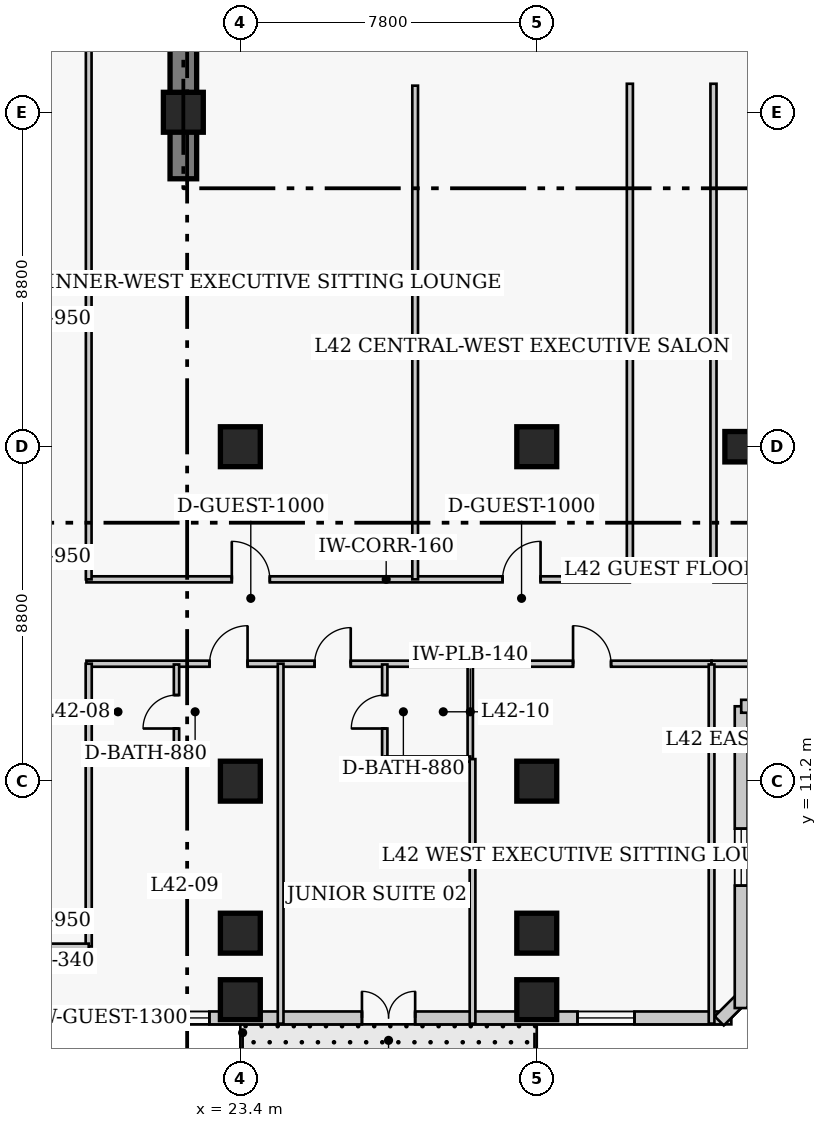
"""IFC4 building model, lengths in metres.
Left out: names, types, materials, properties, quantities, classifications, styles, units other than length and angle.
Written with IfcOpenShell. Run it as: python <this file> out.ifc"""

import sys

from ifc_helpers import new_model, si_unit, direction, frame, frame_2d, origin, origin_2d, place, context, subcontext, project, spatial, rectangle, extrude, element, fill, save


model = new_model("IFC4")
c1 = context("Model", 3, precision=1e-05, world=origin(), true_north=direction((0.0, 1.0)))
c2 = subcontext(c1, "Body", "Model", "MODEL_VIEW")
j1 = project(units=[si_unit("LENGTHUNIT", "METRE"), si_unit("PLANEANGLEUNIT", "RADIAN")], contexts=[c1])
p1 = place(None, origin())
s1 = spatial("IfcSite", under=j1, at=p1, CompositionType="ELEMENT")
p2 = place(p1, origin())
s2 = spatial("IfcBuilding", under=s1, at=p2, CompositionType="ELEMENT")
p3 = place(p2, frame((0.0, 0.0, 168.8)))
s3 = spatial("IfcBuildingStorey", under=s2, at=p3, CompositionType="ELEMENT", Elevation=168.8)
p4 = place(p3, frame((21.9, 27.05, 0.0), z_axis=(0.0, 0.0, 1.0), x_axis=(0.0, 1.0, 0.0)))
e1 = element("IfcWall", 1, at=p4, inside=s3, PredefinedType="SHEAR", context=c2, shape_type="SweptSolid", body=[
    extrude(rectangle(XDim=13.62, YDim=0.7, at=frame_2d((6.81, 0.0))), origin(), (0.0, 0.0, 1.0), 3.8),
])
for number, where, z_axis, x_axis in (
    (2, (23.4, 11.2, 0.0), (0.0, 0.0, 1.0), (1.0, 0.0, 0.0)),
    (3, (23.4, 20.0, 0.0), (0.0, 0.0, 1.0), (1.0, 0.0, 0.0)),
    (4, (31.2, 11.2, 0.0), (0.0, 0.0, 1.0), (1.0, 0.0, 0.0)),
    (5, (31.2, 20.0, 0.0), (0.0, 0.0, 1.0), (1.0, 0.0, 0.0)),
):
    element("IfcColumn", number, at=place(p3, frame(where, z_axis=z_axis, x_axis=x_axis)), inside=s3, PredefinedType="COLUMN", context=c2, shape_type="SweptSolid", body=[
        extrude(rectangle(XDim=1.05, YDim=1.05, at=origin_2d()), origin(), (0.0, 0.0, 1.0), 3.8),
    ])
p5 = place(p3, frame((36.75, 20.0, 0.0), z_axis=(0.0, 0.0, 1.0), x_axis=(1.0, 0.0, 0.0)))
e6 = element("IfcColumn", 6, at=p5, inside=s3, PredefinedType="COLUMN", context=c2, shape_type="SweptSolid", body=[
    extrude(rectangle(XDim=1.2, YDim=0.8, at=origin_2d()), origin(), (0.0, 0.0, 1.0), 3.8),
])
for number, where, z_axis, x_axis in (
    (7, (21.9, 28.8, 0.0), (0.0, 0.0, 1.0), (1.0, 0.0, 0.0)),
    (8, (23.4, 7.2, 0.0), (0.0, 0.0, 1.0), (1.0, 0.0, 0.0)),
    (9, (31.2, 7.2, 0.0), (0.0, 0.0, 1.0), (1.0, 0.0, 0.0)),
    (10, (23.4, 5.45, 0.0), (0.0, 0.0, 1.0), (1.0, 0.0, 0.0)),
    (11, (31.2, 5.45, 0.0), (0.0, 0.0, 1.0), (1.0, 0.0, 0.0)),
):
    element("IfcColumn", number, at=place(p3, frame(where, z_axis=z_axis, x_axis=x_axis)), inside=s3, PredefinedType="COLUMN", context=c2, shape_type="SweptSolid", body=[
        extrude(rectangle(XDim=1.05, YDim=1.05, at=origin_2d()), origin(), (0.0, 0.0, 1.0), 3.8),
    ])
p6 = place(p3, frame((9.63, 4.97, 0.0), z_axis=(0.0, 0.0, 1.0), x_axis=(1.0, 0.0, 0.0)))
e12 = element("IfcWall", 12, at=p6, inside=s3, PredefinedType="SOLIDWALL", context=c2, shape_type="SweptSolid", body=[
    extrude(rectangle(XDim=26.69, YDim=0.34, at=frame_2d((13.345, 0.0))), origin(), (0.0, 0.0, 1.0), 3.55),
])
p7 = place(p6, frame((16.97, 0.0, 0.0)))
e13 = element("IfcOpeningElement", 13, at=p7, cuts=e12, PredefinedType="OPENING", context=c2, shape_type="SweptSolid", body=[
    extrude(rectangle(XDim=1.4, YDim=2.15, at=frame_2d((0.7, 1.075))), frame((0.0, 0.18, 0.0), z_axis=(0.0, -1.0, 0.0), x_axis=(1.0, 0.0, 0.0)), (0.0, 0.0, 1.0), 0.36),
])
p8 = place(p6, frame((3.048, 0.0, 0.85)))
e14 = element("IfcOpeningElement", 14, at=p8, cuts=e12, PredefinedType="OPENING", context=c2, shape_type="SweptSolid", body=[
    extrude(rectangle(XDim=1.5, YDim=1.75, at=frame_2d((0.75, 0.875))), frame((0.0, 0.18, 0.0), z_axis=(0.0, -1.0, 0.0), x_axis=(1.0, 0.0, 0.0)), (0.0, 0.0, 1.0), 0.36),
])
p9 = place(p6, frame((22.642, 0.0, 0.85)))
e15 = element("IfcOpeningElement", 15, at=p9, cuts=e12, PredefinedType="OPENING", context=c2, shape_type="SweptSolid", body=[
    extrude(rectangle(XDim=1.5, YDim=1.75, at=frame_2d((0.75, 0.875))), frame((0.0, 0.18, 0.0), z_axis=(0.0, -1.0, 0.0), x_axis=(1.0, 0.0, 0.0)), (0.0, 0.0, 1.0), 0.36),
])
p10 = place(p6, frame((11.655, 0.0, 0.85)))
e16 = element("IfcOpeningElement", 16, at=p10, cuts=e12, PredefinedType="OPENING", context=c2, shape_type="SweptSolid", body=[
    extrude(rectangle(XDim=1.3, YDim=1.7, at=frame_2d((0.65, 0.85))), frame((0.0, 0.18, 0.0), z_axis=(0.0, -1.0, 0.0), x_axis=(1.0, 0.0, 0.0)), (0.0, 0.0, 1.0), 0.36),
])
p11 = place(p3, frame((36.001, 4.892, 0.0), z_axis=(0.0, 0.0, 1.0), x_axis=(0.707106781187, 0.707106781187, 0.0)))
e17 = element("IfcWall", 17, at=p11, inside=s3, PredefinedType="SOLIDWALL", context=c2, shape_type="SweptSolid", body=[
    extrude(rectangle(XDim=0.929, YDim=0.34, at=frame_2d((0.464, 0.0))), origin(), (0.0, 0.0, 1.0), 3.55),
])
p12 = place(p3, frame((36.58, 5.23, 0.0), z_axis=(0.0, 0.0, 1.0), x_axis=(0.0, 1.0, 0.0)))
e18 = element("IfcWall", 18, at=p12, inside=s3, PredefinedType="SOLIDWALL", context=c2, shape_type="SweptSolid", body=[
    extrude(rectangle(XDim=7.94, YDim=0.34, at=frame_2d((3.97, 0.0))), origin(), (0.0, 0.0, 1.0), 3.55),
])
p13 = place(p12, frame((3.22, 0.0, 0.85)))
e19 = element("IfcOpeningElement", 19, at=p13, cuts=e18, PredefinedType="OPENING", context=c2, shape_type="SweptSolid", body=[
    extrude(rectangle(XDim=1.5, YDim=1.75, at=frame_2d((0.75, 0.875))), frame((0.0, 0.18, 0.0), z_axis=(0.0, -1.0, 0.0), x_axis=(1.0, 0.0, 0.0)), (0.0, 0.0, 1.0), 0.36),
])
p14 = place(p3, frame((36.58, 13.17, 0.0), z_axis=(0.0, 0.0, 1.0), x_axis=(1.0, 0.0, 0.0)))
e20 = element("IfcWall", 20, at=p14, inside=s3, PredefinedType="SOLIDWALL", context=c2, shape_type="SweptSolid", body=[
    extrude(rectangle(XDim=4.84, YDim=0.34, at=frame_2d((2.42, 0.0))), origin(), (0.0, 0.0, 1.0), 3.55),
])
p15 = place(p14, frame((1.67, 0.0, 0.85)))
e21 = element("IfcOpeningElement", 21, at=p15, cuts=e20, PredefinedType="OPENING", context=c2, shape_type="SweptSolid", body=[
    extrude(rectangle(XDim=1.5, YDim=1.75, at=frame_2d((0.75, 0.875))), frame((0.0, 0.18, 0.0), z_axis=(0.0, -1.0, 0.0), x_axis=(1.0, 0.0, 0.0)), (0.0, 0.0, 1.0), 0.36),
])
p16 = place(p3, frame((19.35, 16.51, 0.0), z_axis=(0.0, 0.0, 1.0), x_axis=(1.0, 0.0, 0.0)))
e22 = element("IfcWall", 22, at=p16, inside=s3, PredefinedType="PARTITIONING", context=c2, shape_type="SweptSolid", body=[
    extrude(rectangle(XDim=14.3, YDim=0.16, at=frame_2d((7.15, 0.0))), origin(), (0.0, 0.0, 1.0), 3.55),
])
p17 = place(p16, frame((3.825, 0.0, 0.0)))
e23 = element("IfcOpeningElement", 23, at=p17, cuts=e22, PredefinedType="OPENING", context=c2, shape_type="SweptSolid", body=[
    extrude(rectangle(XDim=1.0, YDim=2.15, at=frame_2d((0.5, 1.075))), frame((0.0, 0.09, 0.0), z_axis=(0.0, -1.0, 0.0), x_axis=(1.0, 0.0, 0.0)), (0.0, 0.0, 1.0), 0.18),
])
p18 = place(p16, frame((10.95, 0.0, 0.0)))
e24 = element("IfcOpeningElement", 24, at=p18, cuts=e22, PredefinedType="OPENING", context=c2, shape_type="SweptSolid", body=[
    extrude(rectangle(XDim=1.0, YDim=2.15, at=frame_2d((0.5, 1.075))), frame((0.0, 0.09, 0.0), z_axis=(0.0, -1.0, 0.0), x_axis=(1.0, 0.0, 0.0)), (0.0, 0.0, 1.0), 0.18),
])
p19 = place(p3, frame((35.85, 16.51, 0.0), z_axis=(0.0, 0.0, 1.0), x_axis=(1.0, 0.0, 0.0)))
e25 = element("IfcWall", 25, at=p19, inside=s3, PredefinedType="PARTITIONING", context=c2, shape_type="SweptSolid", body=[
    extrude(rectangle(XDim=22.6, YDim=0.16, at=frame_2d((11.3, 0.0))), origin(), (0.0, 0.0, 1.0), 3.55),
])
p20 = place(p19, frame((10.35, 0.0, 0.0)))
e26 = element("IfcOpeningElement", 26, at=p20, cuts=e25, PredefinedType="OPENING", context=c2, shape_type="SweptSolid", body=[
    extrude(rectangle(XDim=1.0, YDim=2.15, at=frame_2d((0.5, 1.075))), frame((0.0, 0.09, 0.0), z_axis=(0.0, -1.0, 0.0), x_axis=(1.0, 0.0, 0.0)), (0.0, 0.0, 1.0), 0.18),
])
p21 = place(p19, frame((18.65, 0.0, 0.0)))
e27 = element("IfcOpeningElement", 27, at=p21, cuts=e25, PredefinedType="OPENING", context=c2, shape_type="SweptSolid", body=[
    extrude(rectangle(XDim=1.0, YDim=2.15, at=frame_2d((0.5, 1.075))), frame((0.0, 0.09, 0.0), z_axis=(0.0, -1.0, 0.0), x_axis=(1.0, 0.0, 0.0)), (0.0, 0.0, 1.0), 0.18),
])
for number, where, z_axis, x_axis in (
    (28, (33.65, 16.51, 0.0), (0.0, 0.0, 1.0), (0.0, 1.0, 0.0)),
    (29, (35.85, 16.51, 0.0), (0.0, 0.0, 1.0), (0.0, 1.0, 0.0)),
):
    element("IfcWall", number, at=place(p3, frame(where, z_axis=z_axis, x_axis=x_axis)), inside=s3, PredefinedType="PARTITIONING", context=c2, shape_type="SweptSolid", body=[
        extrude(rectangle(XDim=13.04, YDim=0.16, at=frame_2d((6.52, 0.0))), origin(), (0.0, 0.0, 1.0), 3.55),
    ])
p22 = place(p3, frame((19.35, 14.29, 0.0), z_axis=(0.0, 0.0, 1.0), x_axis=(1.0, 0.0, 0.0)))
e30 = element("IfcWall", 30, at=p22, inside=s3, PredefinedType="PARTITIONING", context=c2, shape_type="SweptSolid", body=[
    extrude(rectangle(XDim=16.45, YDim=0.16, at=frame_2d((8.225, 0.0))), origin(), (0.0, 0.0, 1.0), 3.55),
])
p23 = place(p22, frame((3.24, 0.0, 0.0)))
e31 = element("IfcOpeningElement", 31, at=p23, cuts=e30, PredefinedType="OPENING", context=c2, shape_type="SweptSolid", body=[
    extrude(rectangle(XDim=1.0, YDim=2.15, at=frame_2d((0.5, 1.075))), frame((0.0, 0.09, 0.0), z_axis=(0.0, -1.0, 0.0), x_axis=(1.0, 0.0, 0.0)), (0.0, 0.0, 1.0), 0.18),
])
p24 = place(p22, frame((6.005, 0.0, 0.0)))
e32 = element("IfcOpeningElement", 32, at=p24, cuts=e30, PredefinedType="OPENING", context=c2, shape_type="SweptSolid", body=[
    extrude(rectangle(XDim=0.95, YDim=2.1, at=frame_2d((0.475, 1.05))), frame((0.0, 0.09, 0.0), z_axis=(0.0, -1.0, 0.0), x_axis=(1.0, 0.0, 0.0)), (0.0, 0.0, 1.0), 0.18),
])
p25 = place(p22, frame((12.805, 0.0, 0.0)))
e33 = element("IfcOpeningElement", 33, at=p25, cuts=e30, PredefinedType="OPENING", context=c2, shape_type="SweptSolid", body=[
    extrude(rectangle(XDim=1.0, YDim=2.15, at=frame_2d((0.5, 1.075))), frame((0.0, 0.09, 0.0), z_axis=(0.0, -1.0, 0.0), x_axis=(1.0, 0.0, 0.0)), (0.0, 0.0, 1.0), 0.18),
])
p26 = place(p3, frame((35.8, 14.29, 0.0), z_axis=(0.0, 0.0, 1.0), x_axis=(1.0, 0.0, 0.0)))
e34 = element("IfcWall", 34, at=p26, inside=s3, PredefinedType="PARTITIONING", context=c2, shape_type="SweptSolid", body=[
    extrude(rectangle(XDim=22.65, YDim=0.16, at=frame_2d((11.325, 0.0))), origin(), (0.0, 0.0, 1.0), 3.55),
])
p27 = place(p26, frame((4.873, 0.0, 0.0)))
e35 = element("IfcOpeningElement", 35, at=p27, cuts=e34, PredefinedType="OPENING", context=c2, shape_type="SweptSolid", body=[
    extrude(rectangle(XDim=1.0, YDim=2.15, at=frame_2d((0.5, 1.075))), frame((0.0, 0.09, 0.0), z_axis=(0.0, -1.0, 0.0), x_axis=(1.0, 0.0, 0.0)), (0.0, 0.0, 1.0), 0.18),
])
p28 = place(p3, frame((19.41, 6.85, 0.0), z_axis=(0.0, 0.0, 1.0), x_axis=(0.0, 1.0, 0.0)))
e36 = element("IfcWall", 36, at=p28, inside=s3, PredefinedType="PARTITIONING", context=c2, shape_type="SweptSolid", body=[
    extrude(rectangle(XDim=7.44, YDim=0.16, at=frame_2d((3.72, 0.0))), origin(), (0.0, 0.0, 1.0), 3.093),
])
p29 = place(p3, frame((17.19, 6.85, 0.0), z_axis=(0.0, 0.0, 1.0), x_axis=(1.0, 0.0, 0.0)))
e37 = element("IfcWall", 37, at=p29, inside=s3, PredefinedType="PARTITIONING", context=c2, shape_type="SweptSolid", body=[
    extrude(rectangle(XDim=2.22, YDim=0.15, at=frame_2d((1.11, 0.0))), origin(), (0.0, 0.0, 1.0), 3.55),
])
p30 = place(p3, frame((19.41, 16.51, 0.0), z_axis=(0.0, 0.0, 1.0), x_axis=(0.0, 1.0, 0.0)))
e38 = element("IfcWall", 38, at=p30, inside=s3, PredefinedType="PARTITIONING", context=c2, shape_type="SweptSolid", body=[
    extrude(rectangle(XDim=16.29, YDim=0.15, at=frame_2d((8.145, 0.0))), origin(), (0.0, 0.0, 1.0), 3.093),
])
p31 = place(p3, frame((28.0, 16.51, 0.0), z_axis=(0.0, 0.0, 1.0), x_axis=(0.0, 1.0, 0.0)))
e39 = element("IfcWall", 39, at=p31, inside=s3, PredefinedType="PARTITIONING", context=c2, shape_type="SweptSolid", body=[
    extrude(rectangle(XDim=12.99, YDim=0.15, at=frame_2d((6.495, 0.0))), origin(), (0.0, 0.0, 1.0), 3.55),
])
p32 = place(p3, frame((21.72, 11.78, 0.0), z_axis=(0.0, 0.0, 1.0), x_axis=(0.0, 1.0, 0.0)))
e40 = element("IfcWall", 40, at=p32, inside=s3, PredefinedType="PLUMBINGWALL", context=c2, shape_type="SweptSolid", body=[
    extrude(rectangle(XDim=2.49, YDim=0.14, at=frame_2d((1.245, 0.0))), origin(), (0.0, 0.0, 1.0), 3.55),
])
p33 = place(p32, frame((0.805, 0.0, 0.0)))
e41 = element("IfcOpeningElement", 41, at=p33, cuts=e40, PredefinedType="OPENING", context=c2, shape_type="SweptSolid", body=[
    extrude(rectangle(XDim=0.88, YDim=2.05, at=frame_2d((0.44, 1.025))), frame((0.0, 0.08, 0.0), z_axis=(0.0, -1.0, 0.0), x_axis=(1.0, 0.0, 0.0)), (0.0, 0.0, 1.0), 0.16),
])
p34 = place(p3, frame((19.47, 11.78, 0.0), z_axis=(0.0, 0.0, 1.0), x_axis=(1.0, 0.0, 0.0)))
e42 = element("IfcWall", 42, at=p34, inside=s3, PredefinedType="PLUMBINGWALL", context=c2, shape_type="SweptSolid", body=[
    extrude(rectangle(XDim=2.25, YDim=0.14, at=frame_2d((1.125, 0.0))), origin(), (0.0, 0.0, 1.0), 3.55),
])
p35 = place(p3, frame((24.46, 4.82, 0.0), z_axis=(0.0, 0.0, 1.0), x_axis=(0.0, 1.0, 0.0)))
e43 = element("IfcWall", 43, at=p35, inside=s3, PredefinedType="PARTITIONING", context=c2, shape_type="SweptSolid", body=[
    extrude(rectangle(XDim=9.47, YDim=0.15, at=frame_2d((4.735, 0.0))), origin(), (0.0, 0.0, 1.0), 3.55),
])
p36 = place(p3, frame((27.2, 11.78, 0.0), z_axis=(0.0, 0.0, 1.0), x_axis=(0.0, 1.0, 0.0)))
e44 = element("IfcWall", 44, at=p36, inside=s3, PredefinedType="PLUMBINGWALL", context=c2, shape_type="SweptSolid", body=[
    extrude(rectangle(XDim=2.49, YDim=0.14, at=frame_2d((1.245, 0.0))), origin(), (0.0, 0.0, 1.0), 3.093),
])
p37 = place(p36, frame((0.805, 0.0, 0.0)))
e45 = element("IfcOpeningElement", 45, at=p37, cuts=e44, PredefinedType="OPENING", context=c2, shape_type="SweptSolid", body=[
    extrude(rectangle(XDim=0.88, YDim=2.05, at=frame_2d((0.44, 1.025))), frame((0.0, 0.08, 0.0), z_axis=(0.0, -1.0, 0.0), x_axis=(1.0, 0.0, 0.0)), (0.0, 0.0, 1.0), 0.16),
])
p38 = place(p3, frame((29.45, 11.78, 0.0), z_axis=(0.0, 0.0, 1.0), x_axis=(0.0, 1.0, 0.0)))
e46 = element("IfcWall", 46, at=p38, inside=s3, PredefinedType="PLUMBINGWALL", context=c2, shape_type="SweptSolid", body=[
    extrude(rectangle(XDim=2.49, YDim=0.14, at=frame_2d((1.245, 0.0))), origin(), (0.0, 0.0, 1.0), 3.55),
])
p39 = place(p3, frame((27.2, 11.78, 0.0), z_axis=(0.0, 0.0, 1.0), x_axis=(1.0, 0.0, 0.0)))
e47 = element("IfcWall", 47, at=p39, inside=s3, PredefinedType="PLUMBINGWALL", context=c2, shape_type="SweptSolid", body=[
    extrude(rectangle(XDim=2.25, YDim=0.14, at=frame_2d((1.125, 0.0))), origin(), (0.0, 0.0, 1.0), 3.55),
])
p40 = place(p3, frame((29.51, 4.82, 0.0), z_axis=(0.0, 0.0, 1.0), x_axis=(0.0, 1.0, 0.0)))
e48 = element("IfcWall", 48, at=p40, inside=s3, PredefinedType="PARTITIONING", context=c2, shape_type="SweptSolid", body=[
    extrude(rectangle(XDim=6.96, YDim=0.15, at=frame_2d((3.48, 0.0))), origin(), (0.0, 0.0, 1.0), 3.55),
])
p41 = place(p3, frame((35.8, 4.82, 0.0), z_axis=(0.0, 0.0, 1.0), x_axis=(0.0, 1.0, 0.0)))
e49 = element("IfcWall", 49, at=p41, inside=s3, PredefinedType="PARTITIONING", context=c2, shape_type="SweptSolid", body=[
    extrude(rectangle(XDim=9.45, YDim=0.15, at=frame_2d((4.725, 0.0))), origin(), (0.0, 0.0, 1.0), 3.55),
])
p42 = place(p7, origin())
e50 = element("IfcDoor", 50, at=p42, inside=s3, OperationType="DOUBLE_DOOR_SINGLE_SWING", PredefinedType="DOOR", context=c2, shape_type="SweptSolid", body=[
    extrude(rectangle(XDim=1.4, YDim=2.15, at=frame_2d((0.7, 1.075))), frame((0.0, 0.025, 0.0), z_axis=(0.0, -1.0, 0.0), x_axis=(1.0, 0.0, 0.0)), (0.0, 0.0, 1.0), 0.05),
])
fill(e13, e50)
p43 = place(p9, origin())
e51 = element("IfcWindow", 51, at=p43, inside=s3, PartitioningType="SINGLE_PANEL", PredefinedType="WINDOW", context=c2, shape_type="SweptSolid", body=[
    extrude(rectangle(XDim=1.5, YDim=1.75, at=frame_2d((0.75, 0.875))), frame((0.0, 0.03, 0.0), z_axis=(0.0, -1.0, 0.0), x_axis=(1.0, 0.0, 0.0)), (0.0, 0.0, 1.0), 0.06),
])
fill(e15, e51)
p44 = place(p13, origin())
e52 = element("IfcWindow", 52, at=p44, inside=s3, PartitioningType="SINGLE_PANEL", PredefinedType="WINDOW", context=c2, shape_type="SweptSolid", body=[
    extrude(rectangle(XDim=1.5, YDim=1.75, at=frame_2d((0.75, 0.875))), frame((0.0, 0.03, 0.0), z_axis=(0.0, -1.0, 0.0), x_axis=(1.0, 0.0, 0.0)), (0.0, 0.0, 1.0), 0.06),
])
fill(e19, e52)
p45 = place(p10, origin())
e53 = element("IfcWindow", 53, at=p45, inside=s3, PartitioningType="SINGLE_PANEL", PredefinedType="WINDOW", context=c2, shape_type="SweptSolid", body=[
    extrude(rectangle(XDim=1.3, YDim=1.7, at=frame_2d((0.65, 0.85))), frame((0.0, 0.03, 0.0), z_axis=(0.0, -1.0, 0.0), x_axis=(1.0, 0.0, 0.0)), (0.0, 0.0, 1.0), 0.06),
])
fill(e16, e53)
p46 = place(p17, origin())
e54 = element("IfcDoor", 54, at=p46, inside=s3, OperationType="SINGLE_SWING_LEFT", PredefinedType="DOOR", context=c2, shape_type="SweptSolid", body=[
    extrude(rectangle(XDim=1.0, YDim=2.15, at=frame_2d((0.5, 1.075))), frame((0.0, 0.025, 0.0), z_axis=(0.0, -1.0, 0.0), x_axis=(1.0, 0.0, 0.0)), (0.0, 0.0, 1.0), 0.05),
])
fill(e23, e54)
p47 = place(p18, origin())
e55 = element("IfcDoor", 55, at=p47, inside=s3, OperationType="SINGLE_SWING_RIGHT", PredefinedType="DOOR", context=c2, shape_type="SweptSolid", body=[
    extrude(rectangle(XDim=1.0, YDim=2.15, at=frame_2d((0.5, 1.075))), frame((0.0, 0.025, 0.0), z_axis=(0.0, -1.0, 0.0), x_axis=(1.0, 0.0, 0.0)), (0.0, 0.0, 1.0), 0.05),
])
fill(e24, e55)
p48 = place(p33, origin())
e56 = element("IfcDoor", 56, at=p48, inside=s3, OperationType="SINGLE_SWING_LEFT", PredefinedType="DOOR", context=c2, shape_type="SweptSolid", body=[
    extrude(rectangle(XDim=0.88, YDim=2.05, at=frame_2d((0.44, 1.025))), frame((0.0, 0.025, 0.0), z_axis=(0.0, -1.0, 0.0), x_axis=(1.0, 0.0, 0.0)), (0.0, 0.0, 1.0), 0.05),
])
fill(e41, e56)
p49 = place(p23, origin())
e57 = element("IfcDoor", 57, at=p49, inside=s3, OperationType="SINGLE_SWING_RIGHT", PredefinedType="DOOR", context=c2, shape_type="SweptSolid", body=[
    extrude(rectangle(XDim=1.0, YDim=2.15, at=frame_2d((0.5, 1.075))), frame((0.0, 0.025, 0.0), z_axis=(0.0, -1.0, 0.0), x_axis=(1.0, 0.0, 0.0)), (0.0, 0.0, 1.0), 0.05),
])
fill(e31, e57)
p50 = place(p37, origin())
e58 = element("IfcDoor", 58, at=p50, inside=s3, OperationType="SINGLE_SWING_LEFT", PredefinedType="DOOR", context=c2, shape_type="SweptSolid", body=[
    extrude(rectangle(XDim=0.88, YDim=2.05, at=frame_2d((0.44, 1.025))), frame((0.0, 0.025, 0.0), z_axis=(0.0, -1.0, 0.0), x_axis=(1.0, 0.0, 0.0)), (0.0, 0.0, 1.0), 0.05),
])
fill(e45, e58)
p51 = place(p24, origin())
e59 = element("IfcDoor", 59, at=p51, inside=s3, OperationType="SINGLE_SWING_RIGHT", PredefinedType="DOOR", context=c2, shape_type="SweptSolid", body=[
    extrude(rectangle(XDim=0.95, YDim=2.1, at=frame_2d((0.475, 1.05))), frame((0.0, 0.025, 0.0), z_axis=(0.0, -1.0, 0.0), x_axis=(1.0, 0.0, 0.0)), (0.0, 0.0, 1.0), 0.05),
])
fill(e32, e59)
p52 = place(p25, origin())
e60 = element("IfcDoor", 60, at=p52, inside=s3, OperationType="SINGLE_SWING_LEFT", PredefinedType="DOOR", context=c2, shape_type="SweptSolid", body=[
    extrude(rectangle(XDim=1.0, YDim=2.15, at=frame_2d((0.5, 1.075))), frame((0.0, 0.025, 0.0), z_axis=(0.0, -1.0, 0.0), x_axis=(1.0, 0.0, 0.0)), (0.0, 0.0, 1.0), 0.05),
])
fill(e33, e60)
save(model, sys.argv[1])
